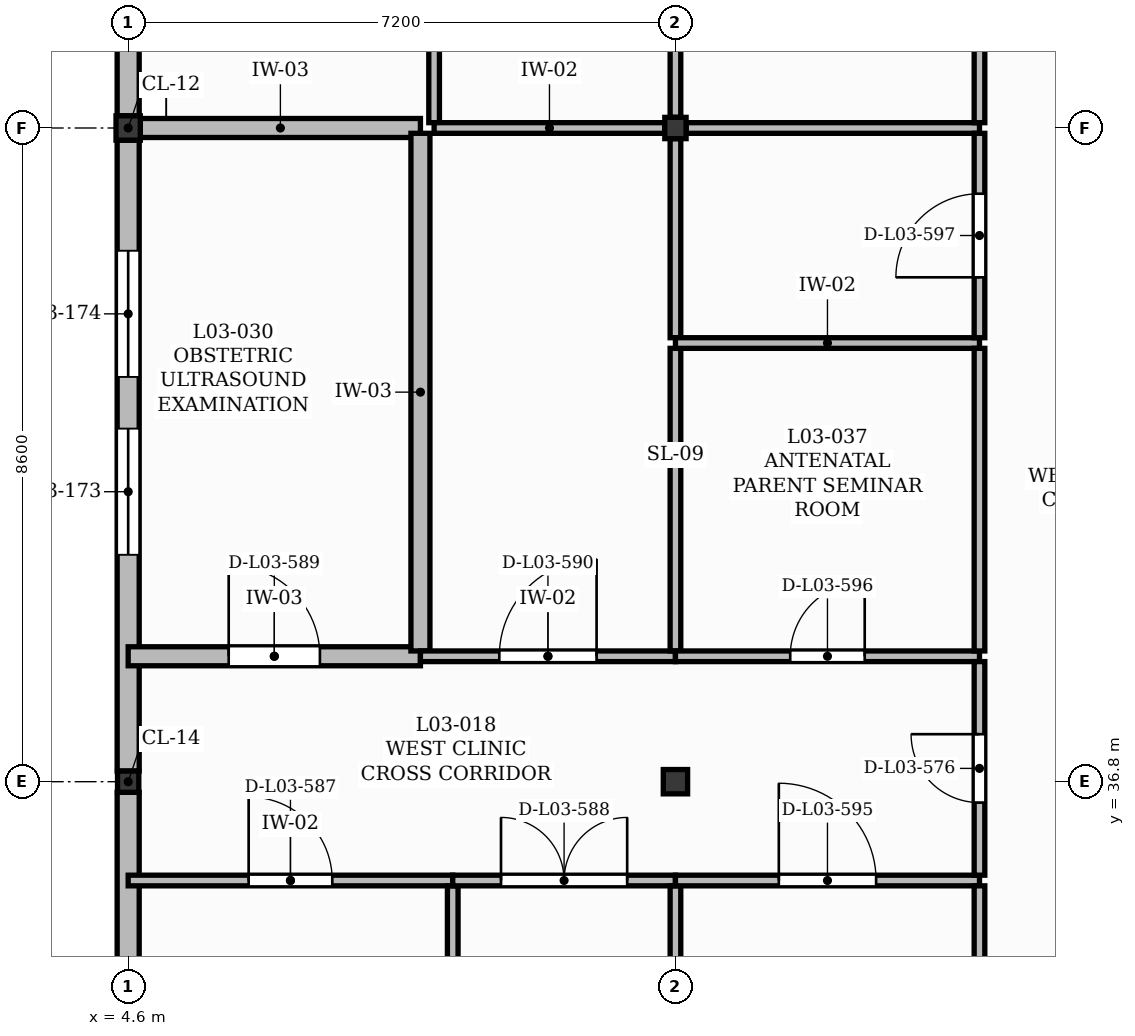
"""IFC4 building model, lengths in metres.
Left out: names, types, materials, properties, quantities, classifications, styles, units other than length and angle.
Written with IfcOpenShell. Run it as: python <this file> out.ifc"""

import sys

from ifc_helpers import new_model, si_unit, direction, frame, frame_2d, origin, origin_2d, place, context, subcontext, project, spatial, rectangle, extrude, element, fill, save


model = new_model("IFC4")
c1 = context("Model", 3, precision=1e-05, world=origin(), true_north=direction((0.0, 1.0)))
c2 = subcontext(c1, "Body", "Model", "MODEL_VIEW")
j1 = project(units=[si_unit("LENGTHUNIT", "METRE"), si_unit("PLANEANGLEUNIT", "RADIAN")], contexts=[c1])
p1 = place(None, origin())
s1 = spatial("IfcSite", under=j1, at=p1, CompositionType="ELEMENT")
p2 = place(p1, origin())
s2 = spatial("IfcBuilding", under=s1, at=p2, CompositionType="ELEMENT")
p3 = place(p2, frame((0.0, 0.0, 13.2)))
s3 = spatial("IfcBuildingStorey", under=s2, at=p3, CompositionType="ELEMENT", Elevation=13.2)
p4 = place(p3, frame((4.6, 36.8, 0.0), z_axis=(0.0, 0.0, 1.0), x_axis=(1.0, 0.0, 0.0)))
e1 = element("IfcColumn", 1, at=p4, inside=s3, PredefinedType="COLUMN", context=c2, shape_type="SweptSolid", body=[
    extrude(rectangle(XDim=0.28, YDim=0.28, at=origin_2d()), origin(), (0.0, 0.0, 1.0), 3.95),
])
p5 = place(p3, frame((4.6, 45.4, 0.0), z_axis=(0.0, 0.0, 1.0), x_axis=(1.0, 0.0, 0.0)))
e2 = element("IfcColumn", 2, at=p5, inside=s3, PredefinedType="COLUMN", context=c2, shape_type="SweptSolid", body=[
    extrude(rectangle(XDim=0.32, YDim=0.32, at=origin_2d()), origin(), (0.0, 0.0, 1.0), 3.98),
])
p6 = place(p3, frame((11.8, 36.8, 0.0), z_axis=(0.0, 0.0, 1.0), x_axis=(1.0, 0.0, 0.0)))
e3 = element("IfcColumn", 3, at=p6, inside=s3, PredefinedType="COLUMN", context=c2, shape_type="SweptSolid", body=[
    extrude(rectangle(XDim=0.32, YDim=0.32, at=origin_2d()), origin(), (0.0, 0.0, 1.0), 3.95),
])
p7 = place(p3, frame((11.8, 45.4, 0.0), z_axis=(0.0, 0.0, 1.0), x_axis=(1.0, 0.0, 0.0)))
e4 = element("IfcColumn", 4, at=p7, inside=s3, PredefinedType="COLUMN", context=c2, shape_type="SweptSolid", body=[
    extrude(rectangle(XDim=0.28, YDim=0.28, at=origin_2d()), origin(), (0.0, 0.0, 1.0), 3.98),
])
p8 = place(p3, frame((4.6, 27.36, 0.0), z_axis=(0.0, 0.0, 1.0), x_axis=(0.0, 1.0, 0.0)))
e5 = element("IfcWall", 5, at=p8, inside=s3, PredefinedType="SOLIDWALL", context=c2, shape_type="SweptSolid", body=[
    extrude(rectangle(XDim=9.3, YDim=0.29, at=frame_2d((4.65, 0.0))), origin(), (0.0, 0.0, 1.0), 3.49),
])
p9 = place(p8, frame((2.41, 0.0, 1.0)))
e6 = element("IfcOpeningElement", 6, at=p9, cuts=e5, PredefinedType="OPENING", context=c2, shape_type="SweptSolid", body=[
    extrude(rectangle(XDim=1.38, YDim=1.8, at=frame_2d((0.69, 0.9))), frame((0.0, 0.155, 0.0), z_axis=(0.0, -1.0, 0.0), x_axis=(1.0, 0.0, 0.0)), (0.0, 0.0, 1.0), 0.31),
])
p10 = place(p8, frame((4.47, 0.0, 1.0)))
e7 = element("IfcOpeningElement", 7, at=p10, cuts=e5, PredefinedType="OPENING", context=c2, shape_type="SweptSolid", body=[
    extrude(rectangle(XDim=1.38, YDim=1.8, at=frame_2d((0.69, 0.9))), frame((0.0, 0.155, 0.0), z_axis=(0.0, -1.0, 0.0), x_axis=(1.0, 0.0, 0.0)), (0.0, 0.0, 1.0), 0.31),
])
p11 = place(p3, frame((4.6, 36.94, 0.0), z_axis=(0.0, 0.0, 1.0), x_axis=(0.0, 1.0, 0.0)))
e8 = element("IfcWall", 8, at=p11, inside=s3, PredefinedType="SOLIDWALL", context=c2, shape_type="SweptSolid", body=[
    extrude(rectangle(XDim=8.3, YDim=0.29, at=frame_2d((4.15, 0.0))), origin(), (0.0, 0.0, 1.0), 3.49),
])
p12 = place(p11, frame((2.845, 0.0, 1.0)))
e9 = element("IfcOpeningElement", 9, at=p12, cuts=e8, PredefinedType="OPENING", context=c2, shape_type="SweptSolid", body=[
    extrude(rectangle(XDim=1.66, YDim=1.8, at=frame_2d((0.83, 0.9))), frame((0.0, 0.155, 0.0), z_axis=(0.0, -1.0, 0.0), x_axis=(1.0, 0.0, 0.0)), (0.0, 0.0, 1.0), 0.31),
])
p13 = place(p11, frame((5.185, 0.0, 1.0)))
e10 = element("IfcOpeningElement", 10, at=p13, cuts=e8, PredefinedType="OPENING", context=c2, shape_type="SweptSolid", body=[
    extrude(rectangle(XDim=1.66, YDim=1.8, at=frame_2d((0.83, 0.9))), frame((0.0, 0.155, 0.0), z_axis=(0.0, -1.0, 0.0), x_axis=(1.0, 0.0, 0.0)), (0.0, 0.0, 1.0), 0.31),
])
p14 = place(p3, frame((4.6, 45.56, 0.0), z_axis=(0.0, 0.0, 1.0), x_axis=(0.0, 1.0, 0.0)))
e11 = element("IfcWall", 11, at=p14, inside=s3, PredefinedType="SOLIDWALL", context=c2, shape_type="SweptSolid", body=[
    extrude(rectangle(XDim=6.9, YDim=0.29, at=frame_2d((3.45, 0.0))), origin(), (0.0, 0.0, 1.0), 3.52),
])
p15 = place(p14, frame((1.61, 0.0, 1.0)))
e12 = element("IfcOpeningElement", 12, at=p15, cuts=e11, PredefinedType="OPENING", context=c2, shape_type="SweptSolid", body=[
    extrude(rectangle(XDim=1.94, YDim=1.8, at=frame_2d((0.97, 0.9))), frame((0.0, 0.155, 0.0), z_axis=(0.0, -1.0, 0.0), x_axis=(1.0, 0.0, 0.0)), (0.0, 0.0, 1.0), 0.31),
])
p16 = place(p3, frame((4.6, 35.5, 0.0), z_axis=(0.0, 0.0, 1.0), x_axis=(1.0, 0.0, 0.0)))
e13 = element("IfcWall", 13, at=p16, inside=s3, PredefinedType="PARTITIONING", context=c2, shape_type="SweptSolid", body=[
    extrude(rectangle(XDim=4.27, YDim=0.14, at=frame_2d((2.135, 0.0))), origin(), (0.0, 0.0, 1.0), 3.93),
])
p17 = place(p16, frame((1.585, 0.0, 0.0)))
e14 = element("IfcOpeningElement", 14, at=p17, cuts=e13, PredefinedType="OPENING", context=c2, shape_type="SweptSolid", body=[
    extrude(rectangle(XDim=1.1, YDim=2.1, at=frame_2d((0.55, 1.05))), frame((0.0, 0.08, 0.0), z_axis=(0.0, -1.0, 0.0), x_axis=(1.0, 0.0, 0.0)), (0.0, 0.0, 1.0), 0.16),
])
p18 = place(p3, frame((4.6, 38.45, 0.0), z_axis=(0.0, 0.0, 1.0), x_axis=(1.0, 0.0, 0.0)))
e15 = element("IfcWall", 15, at=p18, inside=s3, PredefinedType="SOLIDWALL", context=c2, shape_type="SweptSolid", body=[
    extrude(rectangle(XDim=3.845, YDim=0.25, at=frame_2d((1.922, 0.0))), origin(), (0.0, 0.0, 1.0), 3.93),
])
p19 = place(p18, frame((1.323, 0.0, 0.0)))
e16 = element("IfcOpeningElement", 16, at=p19, cuts=e15, PredefinedType="OPENING", context=c2, shape_type="SweptSolid", body=[
    extrude(rectangle(XDim=1.2, YDim=2.15, at=frame_2d((0.6, 1.075))), frame((0.0, 0.135, 0.0), z_axis=(0.0, -1.0, 0.0), x_axis=(1.0, 0.0, 0.0)), (0.0, 0.0, 1.0), 0.27),
])
p20 = place(p3, frame((4.76, 45.4, 0.0), z_axis=(0.0, 0.0, 1.0), x_axis=(1.0, 0.0, 0.0)))
e17 = element("IfcWall", 17, at=p20, inside=s3, PredefinedType="SOLIDWALL", context=c2, shape_type="SweptSolid", body=[
    extrude(rectangle(XDim=3.685, YDim=0.25, at=frame_2d((1.843, 0.0))), origin(), (0.0, 0.0, 1.0), 3.52),
])
p21 = place(p3, frame((8.445, 38.52, 0.0), z_axis=(0.0, 0.0, 1.0), x_axis=(0.0, 1.0, 0.0)))
e18 = element("IfcWall", 18, at=p21, inside=s3, PredefinedType="SOLIDWALL", context=c2, shape_type="SweptSolid", body=[
    extrude(rectangle(XDim=6.81, YDim=0.25, at=frame_2d((3.405, 0.0))), origin(), (0.0, 0.0, 1.0), 3.93),
])
p22 = place(p3, frame((8.445, 38.45, 0.0), z_axis=(0.0, 0.0, 1.0), x_axis=(1.0, 0.0, 0.0)))
e19 = element("IfcWall", 19, at=p22, inside=s3, PredefinedType="PARTITIONING", context=c2, shape_type="SweptSolid", body=[
    extrude(rectangle(XDim=3.355, YDim=0.14, at=frame_2d((1.677, 0.0))), origin(), (0.0, 0.0, 1.0), 3.93),
])
p23 = place(p22, frame((1.038, 0.0, 0.0)))
e20 = element("IfcOpeningElement", 20, at=p23, cuts=e19, PredefinedType="OPENING", context=c2, shape_type="SweptSolid", body=[
    extrude(rectangle(XDim=1.28, YDim=2.2, at=frame_2d((0.64, 1.1))), frame((0.0, 0.08, 0.0), z_axis=(0.0, -1.0, 0.0), x_axis=(1.0, 0.0, 0.0)), (0.0, 0.0, 1.0), 0.16),
])
p24 = place(p3, frame((8.625, 45.47, 0.0), z_axis=(0.0, 0.0, 1.0), x_axis=(0.0, 1.0, 0.0)))
e21 = element("IfcWall", 21, at=p24, inside=s3, PredefinedType="PARTITIONING", context=c2, shape_type="SweptSolid", body=[
    extrude(rectangle(XDim=5.06, YDim=0.14, at=frame_2d((2.53, 0.0))), origin(), (0.0, 0.0, 1.0), 3.93),
])
p25 = place(p3, frame((8.625, 45.4, 0.0), z_axis=(0.0, 0.0, 1.0), x_axis=(1.0, 0.0, 0.0)))
e22 = element("IfcWall", 22, at=p25, inside=s3, PredefinedType="PARTITIONING", context=c2, shape_type="SweptSolid", body=[
    extrude(rectangle(XDim=3.035, YDim=0.14, at=frame_2d((1.518, 0.0))), origin(), (0.0, 0.0, 1.0), 3.52),
])
p26 = place(p3, frame((8.87, 27.2, 0.0), z_axis=(0.0, 0.0, 1.0), x_axis=(0.0, 1.0, 0.0)))
e23 = element("IfcWall", 23, at=p26, inside=s3, PredefinedType="PARTITIONING", context=c2, shape_type="SweptSolid", body=[
    extrude(rectangle(XDim=8.23, YDim=0.14, at=frame_2d((4.115, 0.0))), origin(), (0.0, 0.0, 1.0), 3.93),
])
p27 = place(p3, frame((8.87, 35.5, 0.0), z_axis=(0.0, 0.0, 1.0), x_axis=(1.0, 0.0, 0.0)))
e24 = element("IfcWall", 24, at=p27, inside=s3, PredefinedType="PARTITIONING", context=c2, shape_type="SweptSolid", body=[
    extrude(rectangle(XDim=2.93, YDim=0.14, at=frame_2d((1.465, 0.0))), origin(), (0.0, 0.0, 1.0), 3.93),
])
p28 = place(p27, frame((0.635, 0.0, 0.0)))
e25 = element("IfcOpeningElement", 25, at=p28, cuts=e24, PredefinedType="OPENING", context=c2, shape_type="SweptSolid", body=[
    extrude(rectangle(XDim=1.66, YDim=2.3, at=frame_2d((0.83, 1.15))), frame((0.0, 0.08, 0.0), z_axis=(0.0, -1.0, 0.0), x_axis=(1.0, 0.0, 0.0)), (0.0, 0.0, 1.0), 0.16),
])
p29 = place(p3, frame((11.8, 32.126, 0.0), z_axis=(0.0, 0.0, 1.0), x_axis=(0.0, 1.0, 0.0)))
e26 = element("IfcWall", 26, at=p29, inside=s3, PredefinedType="PARTITIONING", context=c2, shape_type="SweptSolid", body=[
    extrude(rectangle(XDim=3.304, YDim=0.14, at=frame_2d((1.652, 0.0))), origin(), (0.0, 0.0, 1.0), 3.49),
])
p30 = place(p3, frame((11.8, 35.5, 0.0), z_axis=(0.0, 0.0, 1.0), x_axis=(1.0, 0.0, 0.0)))
e27 = element("IfcWall", 27, at=p30, inside=s3, PredefinedType="PARTITIONING", context=c2, shape_type="SweptSolid", body=[
    extrude(rectangle(XDim=4.0, YDim=0.14, at=frame_2d((2.0, 0.0))), origin(), (0.0, 0.0, 1.0), 3.93),
])
p31 = place(p30, frame((1.36, 0.0, 0.0)))
e28 = element("IfcOpeningElement", 28, at=p31, cuts=e27, PredefinedType="OPENING", context=c2, shape_type="SweptSolid", body=[
    extrude(rectangle(XDim=1.28, YDim=2.2, at=frame_2d((0.64, 1.1))), frame((0.0, 0.08, 0.0), z_axis=(0.0, -1.0, 0.0), x_axis=(1.0, 0.0, 0.0)), (0.0, 0.0, 1.0), 0.16),
])
p32 = place(p3, frame((11.8, 38.52, 0.0), z_axis=(0.0, 0.0, 1.0), x_axis=(0.0, 1.0, 0.0)))
e29 = element("IfcWall", 29, at=p32, inside=s3, PredefinedType="PARTITIONING", context=c2, shape_type="SweptSolid", body=[
    extrude(rectangle(XDim=3.981, YDim=0.14, at=frame_2d((1.99, 0.0))), origin(), (0.0, 0.0, 1.0), 3.49),
])
p33 = place(p3, frame((11.8, 38.45, 0.0), z_axis=(0.0, 0.0, 1.0), x_axis=(1.0, 0.0, 0.0)))
e30 = element("IfcWall", 30, at=p33, inside=s3, PredefinedType="PARTITIONING", context=c2, shape_type="SweptSolid", body=[
    extrude(rectangle(XDim=4.0, YDim=0.14, at=frame_2d((2.0, 0.0))), origin(), (0.0, 0.0, 1.0), 3.93),
])
p34 = place(p33, frame((1.51, 0.0, 0.0)))
e31 = element("IfcOpeningElement", 31, at=p34, cuts=e30, PredefinedType="OPENING", context=c2, shape_type="SweptSolid", body=[
    extrude(rectangle(XDim=0.98, YDim=2.15, at=frame_2d((0.49, 1.075))), frame((0.0, 0.08, 0.0), z_axis=(0.0, -1.0, 0.0), x_axis=(1.0, 0.0, 0.0)), (0.0, 0.0, 1.0), 0.16),
])
p35 = place(p3, frame((11.8, 42.641, 0.0), z_axis=(0.0, 0.0, 1.0), x_axis=(0.0, 1.0, 0.0)))
e32 = element("IfcWall", 32, at=p35, inside=s3, PredefinedType="PARTITIONING", context=c2, shape_type="SweptSolid", body=[
    extrude(rectangle(XDim=2.619, YDim=0.14, at=frame_2d((1.31, 0.0))), origin(), (0.0, 0.0, 1.0), 3.49),
])
p36 = place(p3, frame((11.8, 42.571, 0.0), z_axis=(0.0, 0.0, 1.0), x_axis=(1.0, 0.0, 0.0)))
e33 = element("IfcWall", 33, at=p36, inside=s3, PredefinedType="PARTITIONING", context=c2, shape_type="SweptSolid", body=[
    extrude(rectangle(XDim=4.0, YDim=0.14, at=frame_2d((2.0, 0.0))), origin(), (0.0, 0.0, 1.0), 3.93),
])
p37 = place(p3, frame((11.8, 45.54, 0.0), z_axis=(0.0, 0.0, 1.0), x_axis=(0.0, 1.0, 0.0)))
e34 = element("IfcWall", 34, at=p37, inside=s3, PredefinedType="PARTITIONING", context=c2, shape_type="SweptSolid", body=[
    extrude(rectangle(XDim=4.99, YDim=0.14, at=frame_2d((2.495, 0.0))), origin(), (0.0, 0.0, 1.0), 3.46),
])
p38 = place(p3, frame((11.94, 45.4, 0.0), z_axis=(0.0, 0.0, 1.0), x_axis=(1.0, 0.0, 0.0)))
e35 = element("IfcWall", 35, at=p38, inside=s3, PredefinedType="PARTITIONING", context=c2, shape_type="SweptSolid", body=[
    extrude(rectangle(XDim=3.86, YDim=0.14, at=frame_2d((1.93, 0.0))), origin(), (0.0, 0.0, 1.0), 3.52),
])
p39 = place(p3, frame((15.8, 32.126, 0.0), z_axis=(0.0, 0.0, 1.0), x_axis=(0.0, 1.0, 0.0)))
e36 = element("IfcWall", 36, at=p39, inside=s3, PredefinedType="PARTITIONING", context=c2, shape_type="SweptSolid", body=[
    extrude(rectangle(XDim=3.304, YDim=0.14, at=frame_2d((1.652, 0.0))), origin(), (0.0, 0.0, 1.0), 3.93),
])
p40 = place(p3, frame((15.8, 35.57, 0.0), z_axis=(0.0, 0.0, 1.0), x_axis=(0.0, 1.0, 0.0)))
e37 = element("IfcWall", 37, at=p40, inside=s3, PredefinedType="PARTITIONING", context=c2, shape_type="SweptSolid", body=[
    extrude(rectangle(XDim=2.81, YDim=0.14, at=frame_2d((1.405, 0.0))), origin(), (0.0, 0.0, 1.0), 3.93),
])
p41 = place(p40, frame((0.955, 0.0, 0.0)))
e38 = element("IfcOpeningElement", 38, at=p41, cuts=e37, PredefinedType="OPENING", context=c2, shape_type="SweptSolid", body=[
    extrude(rectangle(XDim=0.9, YDim=2.1, at=frame_2d((0.45, 1.05))), frame((0.0, 0.08, 0.0), z_axis=(0.0, -1.0, 0.0), x_axis=(1.0, 0.0, 0.0)), (0.0, 0.0, 1.0), 0.16),
])
p42 = place(p3, frame((15.8, 38.52, 0.0), z_axis=(0.0, 0.0, 1.0), x_axis=(0.0, 1.0, 0.0)))
e39 = element("IfcWall", 39, at=p42, inside=s3, PredefinedType="PARTITIONING", context=c2, shape_type="SweptSolid", body=[
    extrude(rectangle(XDim=3.981, YDim=0.14, at=frame_2d((1.99, 0.0))), origin(), (0.0, 0.0, 1.0), 3.93),
])
p43 = place(p3, frame((15.8, 42.641, 0.0), z_axis=(0.0, 0.0, 1.0), x_axis=(0.0, 1.0, 0.0)))
e40 = element("IfcWall", 40, at=p43, inside=s3, PredefinedType="PARTITIONING", context=c2, shape_type="SweptSolid", body=[
    extrude(rectangle(XDim=2.689, YDim=0.14, at=frame_2d((1.344, 0.0))), origin(), (0.0, 0.0, 1.0), 3.93),
])
p44 = place(p43, frame((0.794, 0.0, 0.0)))
e41 = element("IfcOpeningElement", 41, at=p44, cuts=e40, PredefinedType="OPENING", context=c2, shape_type="SweptSolid", body=[
    extrude(rectangle(XDim=1.1, YDim=2.1, at=frame_2d((0.55, 1.05))), frame((0.0, 0.08, 0.0), z_axis=(0.0, -1.0, 0.0), x_axis=(1.0, 0.0, 0.0)), (0.0, 0.0, 1.0), 0.16),
])
p45 = place(p3, frame((15.8, 45.47, 0.0), z_axis=(0.0, 0.0, 1.0), x_axis=(0.0, 1.0, 0.0)))
e42 = element("IfcWall", 42, at=p45, inside=s3, PredefinedType="PARTITIONING", context=c2, shape_type="SweptSolid", body=[
    extrude(rectangle(XDim=5.06, YDim=0.14, at=frame_2d((2.53, 0.0))), origin(), (0.0, 0.0, 1.0), 3.93),
])
p46 = place(p12, origin())
e43 = element("IfcWindow", 43, at=p46, inside=s3, PartitioningType="DOUBLE_PANEL_VERTICAL", PredefinedType="WINDOW", context=c2, shape_type="SweptSolid", body=[
    extrude(rectangle(XDim=1.66, YDim=1.8, at=frame_2d((0.83, 0.9))), frame((0.0, 0.03, 0.0), z_axis=(0.0, -1.0, 0.0), x_axis=(1.0, 0.0, 0.0)), (0.0, 0.0, 1.0), 0.06),
])
fill(e9, e43)
p47 = place(p13, origin())
e44 = element("IfcWindow", 44, at=p47, inside=s3, PartitioningType="DOUBLE_PANEL_VERTICAL", PredefinedType="WINDOW", context=c2, shape_type="SweptSolid", body=[
    extrude(rectangle(XDim=1.66, YDim=1.8, at=frame_2d((0.83, 0.9))), frame((0.0, 0.03, 0.0), z_axis=(0.0, -1.0, 0.0), x_axis=(1.0, 0.0, 0.0)), (0.0, 0.0, 1.0), 0.06),
])
fill(e10, e44)
p48 = place(p41, origin())
e45 = element("IfcDoor", 45, at=p48, inside=s3, OperationType="SINGLE_SWING_RIGHT", PredefinedType="DOOR", context=c2, shape_type="SweptSolid", body=[
    extrude(rectangle(XDim=0.9, YDim=2.1, at=frame_2d((0.45, 1.05))), frame((0.0, 0.025, 0.0), z_axis=(0.0, -1.0, 0.0), x_axis=(1.0, 0.0, 0.0)), (0.0, 0.0, 1.0), 0.05),
])
fill(e38, e45)
p49 = place(p17, origin())
e46 = element("IfcDoor", 46, at=p49, inside=s3, OperationType="SINGLE_SWING_LEFT", PredefinedType="DOOR", context=c2, shape_type="SweptSolid", body=[
    extrude(rectangle(XDim=1.1, YDim=2.1, at=frame_2d((0.55, 1.05))), frame((0.0, 0.025, 0.0), z_axis=(0.0, -1.0, 0.0), x_axis=(1.0, 0.0, 0.0)), (0.0, 0.0, 1.0), 0.05),
])
fill(e14, e46)
p50 = place(p28, origin())
e47 = element("IfcDoor", 47, at=p50, inside=s3, OperationType="DOUBLE_DOOR_SINGLE_SWING", PredefinedType="DOOR", context=c2, shape_type="SweptSolid", body=[
    extrude(rectangle(XDim=1.66, YDim=2.3, at=frame_2d((0.83, 1.15))), frame((0.0, 0.025, 0.0), z_axis=(0.0, -1.0, 0.0), x_axis=(1.0, 0.0, 0.0)), (0.0, 0.0, 1.0), 0.05),
])
fill(e25, e47)
p51 = place(p19, origin())
e48 = element("IfcDoor", 48, at=p51, inside=s3, OperationType="SINGLE_SWING_LEFT", PredefinedType="DOOR", context=c2, shape_type="SweptSolid", body=[
    extrude(rectangle(XDim=1.2, YDim=2.15, at=frame_2d((0.6, 1.075))), frame((0.0, 0.025, 0.0), z_axis=(0.0, -1.0, 0.0), x_axis=(1.0, 0.0, 0.0)), (0.0, 0.0, 1.0), 0.05),
])
fill(e16, e48)
p52 = place(p23, origin())
e49 = element("IfcDoor", 49, at=p52, inside=s3, OperationType="SINGLE_SWING_RIGHT", PredefinedType="DOOR", context=c2, shape_type="SweptSolid", body=[
    extrude(rectangle(XDim=1.28, YDim=2.2, at=frame_2d((0.64, 1.1))), frame((0.0, 0.025, 0.0), z_axis=(0.0, -1.0, 0.0), x_axis=(1.0, 0.0, 0.0)), (0.0, 0.0, 1.0), 0.05),
])
fill(e20, e49)
p53 = place(p31, origin())
e50 = element("IfcDoor", 50, at=p53, inside=s3, OperationType="SINGLE_SWING_LEFT", PredefinedType="DOOR", context=c2, shape_type="SweptSolid", body=[
    extrude(rectangle(XDim=1.28, YDim=2.2, at=frame_2d((0.64, 1.1))), frame((0.0, 0.025, 0.0), z_axis=(0.0, -1.0, 0.0), x_axis=(1.0, 0.0, 0.0)), (0.0, 0.0, 1.0), 0.05),
])
fill(e28, e50)
p54 = place(p34, origin())
e51 = element("IfcDoor", 51, at=p54, inside=s3, OperationType="SINGLE_SWING_RIGHT", PredefinedType="DOOR", context=c2, shape_type="SweptSolid", body=[
    extrude(rectangle(XDim=0.98, YDim=2.15, at=frame_2d((0.49, 1.075))), frame((0.0, 0.025, 0.0), z_axis=(0.0, -1.0, 0.0), x_axis=(1.0, 0.0, 0.0)), (0.0, 0.0, 1.0), 0.05),
])
fill(e31, e51)
p55 = place(p44, origin())
e52 = element("IfcDoor", 52, at=p55, inside=s3, OperationType="SINGLE_SWING_LEFT", PredefinedType="DOOR", context=c2, shape_type="SweptSolid", body=[
    extrude(rectangle(XDim=1.1, YDim=2.1, at=frame_2d((0.55, 1.05))), frame((0.0, 0.025, 0.0), z_axis=(0.0, -1.0, 0.0), x_axis=(1.0, 0.0, 0.0)), (0.0, 0.0, 1.0), 0.05),
])
fill(e41, e52)
save(model, sys.argv[1])
